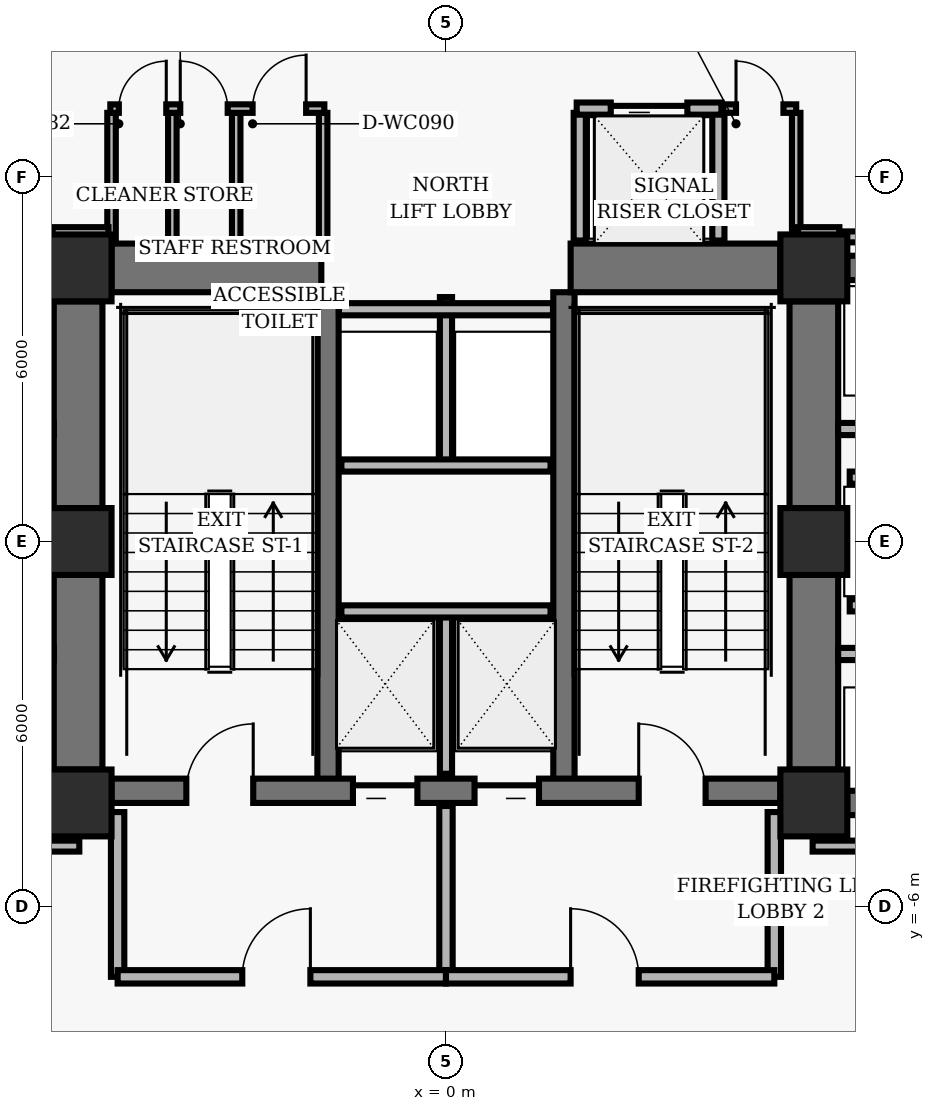
"""IFC4 building model, lengths in metres.
Left out: names, types, materials, properties, quantities, classifications, styles, units other than length and angle.
Written with IfcOpenShell. Run it as: python <this file> out.ifc"""

import sys

from ifc_helpers import new_model, si_unit, direction, frame, frame_2d, origin, origin_2d, place, context, subcontext, project, spatial, rectangle, hollow_rectangle, extrude, element, fill, save


model = new_model("IFC4")
c1 = context("Model", 3, precision=1e-05, world=origin(), true_north=direction((0.0, 1.0)))
c2 = subcontext(c1, "Body", "Model", "MODEL_VIEW")
j1 = project(units=[si_unit("LENGTHUNIT", "METRE"), si_unit("PLANEANGLEUNIT", "RADIAN")], contexts=[c1])
p1 = place(None, origin())
s1 = spatial("IfcSite", under=j1, at=p1, CompositionType="ELEMENT")
p2 = place(p1, origin())
s2 = spatial("IfcBuilding", under=s1, at=p2, CompositionType="ELEMENT")
p3 = place(p2, frame((0.0, 0.0, 8.32)))
s3 = spatial("IfcBuildingStorey", under=s2, at=p3, CompositionType="ELEMENT", Elevation=8.32)
for number, where, z_axis, x_axis in (
    (1, (-6.05, 4.5, 0.0), (0.0, 0.0, 1.0), (1.0, 0.0, 0.0)),
    (2, (6.05, 4.5, 0.0), (0.0, 0.0, 1.0), (1.0, 0.0, 0.0)),
    (3, (-6.05, 0.0, 0.0), (0.0, 0.0, 1.0), (1.0, 0.0, 0.0)),
    (4, (6.05, 0.0, 0.0), (0.0, 0.0, 1.0), (1.0, 0.0, 0.0)),
    (5, (-6.05, -4.3, 0.0), (0.0, 0.0, 1.0), (1.0, 0.0, 0.0)),
    (6, (6.05, -4.3, 0.0), (0.0, 0.0, 1.0), (1.0, 0.0, 0.0)),
):
    element("IfcColumn", number, at=place(p3, frame(where, z_axis=z_axis, x_axis=x_axis)), inside=s3, PredefinedType="COLUMN", context=c2, shape_type="SweptSolid", body=[
        extrude(hollow_rectangle(XDim=1.1, YDim=1.1, WallThickness=0.07, InnerFilletRadius=0.02, OuterFilletRadius=0.04, at=origin_2d()), origin(), (0.0, 0.0, 1.0), 3.52),
    ])
p4 = place(p3, frame((-6.05, 0.55, 0.0), z_axis=(0.0, 0.0, 1.0), x_axis=(0.0, 1.0, 0.0)))
e7 = element("IfcWall", 7, at=p4, inside=s3, PredefinedType="SHEAR", context=c2, shape_type="SweptSolid", body=[
    extrude(rectangle(XDim=3.4, YDim=0.8, at=frame_2d((1.7, 0.0))), origin(), (0.0, 0.0, 1.0), 3.218),
])
p5 = place(p3, frame((-6.05, -3.75, 0.0), z_axis=(0.0, 0.0, 1.0), x_axis=(0.0, 1.0, 0.0)))
e8 = element("IfcWall", 8, at=p5, inside=s3, PredefinedType="SHEAR", context=c2, shape_type="SweptSolid", body=[
    extrude(rectangle(XDim=3.2, YDim=0.8, at=frame_2d((1.6, 0.0))), origin(), (0.0, 0.0, 1.0), 3.218),
])
p6 = place(p3, frame((6.05, 0.55, 0.0), z_axis=(0.0, 0.0, 1.0), x_axis=(0.0, 1.0, 0.0)))
e9 = element("IfcWall", 9, at=p6, inside=s3, PredefinedType="SHEAR", context=c2, shape_type="SweptSolid", body=[
    extrude(rectangle(XDim=3.4, YDim=0.8, at=frame_2d((1.7, 0.0))), origin(), (0.0, 0.0, 1.0), 3.218),
])
p7 = place(p3, frame((6.05, -3.75, 0.0), z_axis=(0.0, 0.0, 1.0), x_axis=(0.0, 1.0, 0.0)))
e10 = element("IfcWall", 10, at=p7, inside=s3, PredefinedType="SHEAR", context=c2, shape_type="SweptSolid", body=[
    extrude(rectangle(XDim=3.2, YDim=0.8, at=frame_2d((1.6, 0.0))), origin(), (0.0, 0.0, 1.0), 3.218),
])
for number, where, z_axis, x_axis in (
    (11, (-1.94, -4.1, 0.0), (0.0, 0.0, 1.0), (0.0, 1.0, 0.0)),
    (12, (1.94, -4.1, 0.0), (0.0, 0.0, 1.0), (0.0, 1.0, 0.0)),
):
    element("IfcWall", number, at=place(p3, frame(where, z_axis=z_axis, x_axis=x_axis)), inside=s3, PredefinedType="SHEAR", context=c2, shape_type="SweptSolid", body=[
        extrude(rectangle(XDim=8.2, YDim=0.35, at=frame_2d((4.1, 0.0))), origin(), (0.0, 0.0, 1.0), 3.218),
    ])
p8 = place(p3, frame((-5.5, -4.1, 0.0), z_axis=(0.0, 0.0, 1.0), x_axis=(1.0, 0.0, 0.0)))
e13 = element("IfcWall", 13, at=p8, inside=s3, PredefinedType="SHEAR", context=c2, shape_type="SweptSolid", body=[
    extrude(rectangle(XDim=11.0, YDim=0.4, at=frame_2d((5.5, 0.0))), origin(), (0.0, 0.0, 1.0), 3.218),
])
p9 = place(p8, frame((1.23, 0.0, 0.0)))
e14 = element("IfcOpeningElement", 14, at=p9, cuts=e13, PredefinedType="OPENING", context=c2, shape_type="SweptSolid", body=[
    extrude(rectangle(XDim=1.1, YDim=2.04, at=frame_2d((0.55, 1.02))), frame((0.0, 0.21, 0.0), z_axis=(0.0, -1.0, 0.0), x_axis=(1.0, 0.0, 0.0)), (0.0, 0.0, 1.0), 0.42),
])
p10 = place(p8, frame((8.67, 0.0, 0.0)))
e15 = element("IfcOpeningElement", 15, at=p10, cuts=e13, PredefinedType="OPENING", context=c2, shape_type="SweptSolid", body=[
    extrude(rectangle(XDim=1.1, YDim=2.04, at=frame_2d((0.55, 1.02))), frame((0.0, 0.21, 0.0), z_axis=(0.0, -1.0, 0.0), x_axis=(1.0, 0.0, 0.0)), (0.0, 0.0, 1.0), 0.42),
])
p11 = place(p8, frame((3.97, 0.0, 0.0)))
e16 = element("IfcOpeningElement", 16, at=p11, cuts=e13, PredefinedType="OPENING", context=c2, shape_type="SweptSolid", body=[
    extrude(rectangle(XDim=1.06, YDim=2.04, at=frame_2d((0.53, 1.02))), frame((0.0, 0.21, 0.0), z_axis=(0.0, -1.0, 0.0), x_axis=(1.0, 0.0, 0.0)), (0.0, 0.0, 1.0), 0.42),
])
p12 = place(p8, frame((5.97, 0.0, 0.0)))
e17 = element("IfcOpeningElement", 17, at=p12, cuts=e13, PredefinedType="OPENING", context=c2, shape_type="SweptSolid", body=[
    extrude(rectangle(XDim=1.06, YDim=2.04, at=frame_2d((0.53, 1.02))), frame((0.0, 0.21, 0.0), z_axis=(0.0, -1.0, 0.0), x_axis=(1.0, 0.0, 0.0)), (0.0, 0.0, 1.0), 0.42),
])
for number, where, z_axis, x_axis in (
    (18, (-5.5, 4.5, 0.0), (0.0, 0.0, 1.0), (1.0, 0.0, 0.0)),
    (19, (2.05, 4.5, 0.0), (0.0, 0.0, 1.0), (1.0, 0.0, 0.0)),
):
    element("IfcWall", number, at=place(p3, frame(where, z_axis=z_axis, x_axis=x_axis)), inside=s3, PredefinedType="SHEAR", context=c2, shape_type="SweptSolid", body=[
        extrude(rectangle(XDim=3.45, YDim=0.8, at=frame_2d((1.725, 0.0))), origin(), (0.0, 0.0, 1.0), 3.218),
    ])
for number, where, z_axis, x_axis in (
    (20, (6.6, 4.5, 0.0), (0.0, 0.0, 1.0), (1.0, 0.0, 0.0)),
    (21, (6.6, -4.3, 0.0), (0.0, 0.0, 1.0), (1.0, 0.0, 0.0)),
):
    element("IfcWall", number, at=place(p3, frame(where, z_axis=z_axis, x_axis=x_axis)), inside=s3, PredefinedType="SHEAR", context=c2, shape_type="SweptSolid", body=[
        extrude(rectangle(XDim=1.8, YDim=0.4, at=frame_2d((0.9, 0.0))), origin(), (0.0, 0.0, 1.0), 3.218),
    ])
p13 = place(p3, frame((0.0, -3.82, 0.0), z_axis=(0.0, 0.0, 1.0), x_axis=(0.0, 1.0, 0.0)))
e22 = element("IfcWall", 22, at=p13, inside=s3, PredefinedType="PARTITIONING", context=c2, shape_type="SweptSolid", body=[
    extrude(rectangle(XDim=2.67, YDim=0.2, at=frame_2d((1.335, 0.0))), origin(), (0.0, 0.0, 1.0), 3.193),
])
p14 = place(p3, frame((-1.72, -1.15, 0.0), z_axis=(0.0, 0.0, 1.0), x_axis=(1.0, 0.0, 0.0)))
e23 = element("IfcWall", 23, at=p14, inside=s3, PredefinedType="PARTITIONING", context=c2, shape_type="SweptSolid", body=[
    extrude(rectangle(XDim=3.44, YDim=0.2, at=frame_2d((1.72, 0.0))), origin(), (0.0, 0.0, 1.0), 3.193),
])
for number, where, z_axis, x_axis in (
    (24, (-5.4, -7.16, 0.0), (0.0, 0.0, 1.0), (0.0, 1.0, 0.0)),
    (25, (5.4, -7.16, 0.0), (0.0, 0.0, 1.0), (0.0, 1.0, 0.0)),
):
    element("IfcWall", number, at=place(p3, frame(where, z_axis=z_axis, x_axis=x_axis)), inside=s3, PredefinedType="PARTITIONING", context=c2, shape_type="SweptSolid", body=[
        extrude(rectangle(XDim=2.71, YDim=0.22, at=frame_2d((1.355, 0.0))), origin(), (0.0, 0.0, 1.0), 3.193),
    ])
p15 = place(p3, frame((0.0, -7.16, 0.0), z_axis=(0.0, 0.0, 1.0), x_axis=(0.0, 1.0, 0.0)))
e26 = element("IfcWall", 26, at=p15, inside=s3, PredefinedType="PARTITIONING", context=c2, shape_type="SweptSolid", body=[
    extrude(rectangle(XDim=2.81, YDim=0.22, at=frame_2d((1.405, 0.0))), origin(), (0.0, 0.0, 1.0), 3.193),
])
p16 = place(p3, frame((-5.4, -7.16, 0.0), z_axis=(0.0, 0.0, 1.0), x_axis=(1.0, 0.0, 0.0)))
e27 = element("IfcWall", 27, at=p16, inside=s3, PredefinedType="PARTITIONING", context=c2, shape_type="SweptSolid", body=[
    extrude(rectangle(XDim=5.4, YDim=0.22, at=frame_2d((2.7, 0.0))), origin(), (0.0, 0.0, 1.0), 3.193),
])
p17 = place(p16, frame((2.05, 0.0, 0.0)))
e28 = element("IfcOpeningElement", 28, at=p17, cuts=e27, PredefinedType="OPENING", context=c2, shape_type="SweptSolid", body=[
    extrude(rectangle(XDim=1.12, YDim=2.02, at=frame_2d((0.56, 1.01))), frame((0.0, 0.12, 0.0), z_axis=(0.0, -1.0, 0.0), x_axis=(1.0, 0.0, 0.0)), (0.0, 0.0, 1.0), 0.24),
])
p18 = place(p3, frame((0.0, -7.16, 0.0), z_axis=(0.0, 0.0, 1.0), x_axis=(1.0, 0.0, 0.0)))
e29 = element("IfcWall", 29, at=p18, inside=s3, PredefinedType="PARTITIONING", context=c2, shape_type="SweptSolid", body=[
    extrude(rectangle(XDim=5.4, YDim=0.22, at=frame_2d((2.7, 0.0))), origin(), (0.0, 0.0, 1.0), 3.193),
])
p19 = place(p18, frame((2.05, 0.0, 0.0)))
e30 = element("IfcOpeningElement", 30, at=p19, cuts=e29, PredefinedType="OPENING", context=c2, shape_type="SweptSolid", body=[
    extrude(rectangle(XDim=1.12, YDim=2.02, at=frame_2d((0.56, 1.01))), frame((0.0, 0.12, 0.0), z_axis=(0.0, -1.0, 0.0), x_axis=(1.0, 0.0, 0.0)), (0.0, 0.0, 1.0), 0.24),
])
p20 = place(p3, frame((0.0, 1.25, 0.0), z_axis=(0.0, 0.0, 1.0), x_axis=(0.0, 1.0, 0.0)))
e31 = element("IfcWall", 31, at=p20, inside=s3, PredefinedType="PARTITIONING", context=c2, shape_type="SweptSolid", body=[
    extrude(rectangle(XDim=2.77, YDim=0.2, at=frame_2d((1.385, 0.0))), origin(), (0.0, 0.0, 1.0), 3.193),
])
p21 = place(p3, frame((-1.72, 1.25, 0.0), z_axis=(0.0, 0.0, 1.0), x_axis=(1.0, 0.0, 0.0)))
e32 = element("IfcWall", 32, at=p21, inside=s3, PredefinedType="PARTITIONING", context=c2, shape_type="SweptSolid", body=[
    extrude(rectangle(XDim=3.44, YDim=0.2, at=frame_2d((1.72, 0.0))), origin(), (0.0, 0.0, 1.0), 3.193),
])
p22 = place(p3, frame((-1.76, 3.82, 0.0), z_axis=(0.0, 0.0, 1.0), x_axis=(1.0, 0.0, 0.0)))
e33 = element("IfcWall", 33, at=p22, inside=s3, PredefinedType="PARTITIONING", context=c2, shape_type="SweptSolid", body=[
    extrude(rectangle(XDim=3.52, YDim=0.2, at=frame_2d((1.76, 0.0))), origin(), (0.0, 0.0, 1.0), 3.193),
])
for number, where, z_axis, x_axis in (
    (34, (2.2, 4.95, 0.0), (0.0, 0.0, 1.0), (0.0, 1.0, 0.0)),
    (35, (4.48, 4.95, 0.0), (0.0, 0.0, 1.0), (0.0, 1.0, 0.0)),
):
    element("IfcWall", number, at=place(p3, frame(where, z_axis=z_axis, x_axis=x_axis)), inside=s3, PredefinedType="PARTITIONING", context=c2, shape_type="SweptSolid", body=[
        extrude(rectangle(XDim=2.1, YDim=0.2, at=frame_2d((1.05, 0.0))), origin(), (0.0, 0.0, 1.0), 3.193),
    ])
p23 = place(p3, frame((2.15, 7.12, 0.0), z_axis=(0.0, 0.0, 1.0), x_axis=(1.0, 0.0, 0.0)))
e36 = element("IfcWall", 36, at=p23, inside=s3, PredefinedType="PARTITIONING", context=c2, shape_type="SweptSolid", body=[
    extrude(rectangle(XDim=2.38, YDim=0.2, at=frame_2d((1.19, 0.0))), origin(), (0.0, 0.0, 1.0), 3.193),
])
p24 = place(p23, frame((0.56, 0.0, 0.0)))
e37 = element("IfcOpeningElement", 37, at=p24, cuts=e36, PredefinedType="OPENING", context=c2, shape_type="SweptSolid", body=[
    extrude(rectangle(XDim=1.26, YDim=2.06, at=frame_2d((0.63, 1.03))), frame((0.0, 0.11, 0.0), z_axis=(0.0, -1.0, 0.0), x_axis=(1.0, 0.0, 0.0)), (0.0, 0.0, 1.0), 0.22),
])
for number, where, z_axis, x_axis in (
    (38, (-5.5, 4.95, 0.0), (0.0, 0.0, 1.0), (0.0, 1.0, 0.0)),
    (39, (-4.5, 4.95, 0.0), (0.0, 0.0, 1.0), (0.0, 1.0, 0.0)),
    (40, (-3.45, 4.95, 0.0), (0.0, 0.0, 1.0), (0.0, 1.0, 0.0)),
    (41, (-2.02, 4.95, 0.0), (0.0, 0.0, 1.0), (0.0, 1.0, 0.0)),
):
    element("IfcWall", number, at=place(p3, frame(where, z_axis=z_axis, x_axis=x_axis)), inside=s3, PredefinedType="PARTITIONING", context=c2, shape_type="SweptSolid", body=[
        extrude(rectangle(XDim=2.1, YDim=0.14, at=frame_2d((1.05, 0.0))), origin(), (0.0, 0.0, 1.0), 3.193),
    ])
p25 = place(p3, frame((-5.52, 7.12, 0.0), z_axis=(0.0, 0.0, 1.0), x_axis=(1.0, 0.0, 0.0)))
e42 = element("IfcWall", 42, at=p25, inside=s3, PredefinedType="PARTITIONING", context=c2, shape_type="SweptSolid", body=[
    extrude(rectangle(XDim=3.52, YDim=0.14, at=frame_2d((1.76, 0.0))), origin(), (0.0, 0.0, 1.0), 3.193),
])
p26 = place(p25, frame((0.14, 0.0, 0.0)))
e43 = element("IfcOpeningElement", 43, at=p26, cuts=e42, PredefinedType="OPENING", context=c2, shape_type="SweptSolid", body=[
    extrude(rectangle(XDim=0.78, YDim=2.01, at=frame_2d((0.39, 1.005))), frame((0.0, 0.08, 0.0), z_axis=(0.0, -1.0, 0.0), x_axis=(1.0, 0.0, 0.0)), (0.0, 0.0, 1.0), 0.16),
])
p27 = place(p25, frame((1.15, 0.0, 0.0)))
e44 = element("IfcOpeningElement", 44, at=p27, cuts=e42, PredefinedType="OPENING", context=c2, shape_type="SweptSolid", body=[
    extrude(rectangle(XDim=0.78, YDim=2.01, at=frame_2d((0.39, 1.005))), frame((0.0, 0.08, 0.0), z_axis=(0.0, -1.0, 0.0), x_axis=(1.0, 0.0, 0.0)), (0.0, 0.0, 1.0), 0.16),
])
p28 = place(p25, frame((2.34, 0.0, 0.0)))
e45 = element("IfcOpeningElement", 45, at=p28, cuts=e42, PredefinedType="OPENING", context=c2, shape_type="SweptSolid", body=[
    extrude(rectangle(XDim=0.88, YDim=2.02, at=frame_2d((0.44, 1.01))), frame((0.0, 0.08, 0.0), z_axis=(0.0, -1.0, 0.0), x_axis=(1.0, 0.0, 0.0)), (0.0, 0.0, 1.0), 0.16),
])
p29 = place(p3, frame((5.76, 4.95, 0.0), z_axis=(0.0, 0.0, 1.0), x_axis=(0.0, 1.0, 0.0)))
e46 = element("IfcWall", 46, at=p29, inside=s3, PredefinedType="PARTITIONING", context=c2, shape_type="SweptSolid", body=[
    extrude(rectangle(XDim=2.1, YDim=0.14, at=frame_2d((1.05, 0.0))), origin(), (0.0, 0.0, 1.0), 2.246),
])
p30 = place(p3, frame((4.56, 7.12, 0.0), z_axis=(0.0, 0.0, 1.0), x_axis=(1.0, 0.0, 0.0)))
e47 = element("IfcWall", 47, at=p30, inside=s3, PredefinedType="PARTITIONING", context=c2, shape_type="SweptSolid", body=[
    extrude(rectangle(XDim=1.2, YDim=0.14, at=frame_2d((0.6, 0.0))), origin(), (0.0, 0.0, 1.0), 3.193),
])
p31 = place(p30, frame((0.21, 0.0, 0.0)))
e48 = element("IfcOpeningElement", 48, at=p31, cuts=e47, PredefinedType="OPENING", context=c2, shape_type="SweptSolid", body=[
    extrude(rectangle(XDim=0.78, YDim=2.01, at=frame_2d((0.39, 1.005))), frame((0.0, 0.08, 0.0), z_axis=(0.0, -1.0, 0.0), x_axis=(1.0, 0.0, 0.0)), (0.0, 0.0, 1.0), 0.16),
])
for number, where, z_axis, x_axis in (
    (49, (-8.55, -1.85, 0.0), (0.0, 0.0, 1.0), (1.0, 0.0, 0.0)),
    (50, (-8.55, 1.85, 0.0), (0.0, 0.0, 1.0), (1.0, 0.0, 0.0)),
    (51, (6.45, -1.85, 0.0), (0.0, 0.0, 1.0), (1.0, 0.0, 0.0)),
    (52, (6.45, 1.85, 0.0), (0.0, 0.0, 1.0), (1.0, 0.0, 0.0)),
):
    element("IfcWall", number, at=place(p3, frame(where, z_axis=z_axis, x_axis=x_axis)), inside=s3, PredefinedType="PARTITIONING", context=c2, shape_type="SweptSolid", body=[
        extrude(rectangle(XDim=2.1, YDim=0.2, at=frame_2d((1.05, 0.0))), origin(), (0.0, 0.0, 1.0), 3.193),
    ])
for number, where, z_axis, x_axis in (
    (53, (6.64, -1.05, 0.0), (0.0, 0.0, 1.0), (1.0, 0.0, 0.0)),
    (54, (6.64, 1.05, 0.0), (0.0, 0.0, 1.0), (1.0, 0.0, 0.0)),
):
    element("IfcWall", number, at=place(p3, frame(where, z_axis=z_axis, x_axis=x_axis)), inside=s3, PredefinedType="PARTITIONING", context=c2, shape_type="SweptSolid", body=[
        extrude(rectangle(XDim=1.91, YDim=0.2, at=frame_2d((0.955, 0.0))), origin(), (0.0, 0.0, 1.0), 3.193),
    ])
for number, where, z_axis, x_axis in (
    (55, (-9.37, -5.01, 0.0), (0.0, 0.0, 1.0), (1.0, 0.0, 0.0)),
    (56, (6.03, -5.01, 0.0), (0.0, 0.0, 1.0), (1.0, 0.0, 0.0)),
):
    element("IfcWall", number, at=place(p3, frame(where, z_axis=z_axis, x_axis=x_axis)), inside=s3, PredefinedType="PARTITIONING", context=c2, shape_type="SweptSolid", body=[
        extrude(rectangle(XDim=3.34, YDim=0.18, at=frame_2d((1.67, 0.0))), origin(), (0.0, 0.0, 1.0), 3.193),
    ])
p32 = place(p3, frame((9.37, 5.01, 0.0), z_axis=(0.0, 0.0, 1.0), x_axis=(-1.0, 0.0, 0.0)))
e57 = element("IfcWall", 57, at=p32, inside=s3, PredefinedType="PARTITIONING", context=c2, shape_type="SweptSolid", body=[
    extrude(rectangle(XDim=2.808, YDim=0.18, at=frame_2d((1.404, 0.0))), origin(), (0.0, 0.0, 1.0), 3.193),
])
p33 = place(p3, frame((6.47, 5.08, 0.0), z_axis=(0.0, 0.0, 1.0), x_axis=(-1.0, 0.0, 0.0)))
e58 = element("IfcWall", 58, at=p33, inside=s3, PredefinedType="PARTITIONING", context=c2, shape_type="SweptSolid", body=[
    extrude(rectangle(XDim=0.68, YDim=0.18, at=frame_2d((0.34, 0.0))), origin(), (0.0, 0.0, 1.0), 3.193),
])
p34 = place(p3, frame((-5.55, 5.08, 0.0), z_axis=(0.0, 0.0, 1.0), x_axis=(-1.0, 0.0, 0.0)))
e59 = element("IfcWall", 59, at=p34, inside=s3, PredefinedType="PARTITIONING", context=c2, shape_type="SweptSolid", body=[
    extrude(rectangle(XDim=0.92, YDim=0.18, at=frame_2d((0.46, 0.0))), origin(), (0.0, 0.0, 1.0), 3.193),
])
p35 = place(p9, origin())
e60 = element("IfcDoor", 60, at=p35, inside=s3, OperationType="SINGLE_SWING_RIGHT", PredefinedType="DOOR", context=c2, shape_type="SweptSolid", body=[
    extrude(rectangle(XDim=1.1, YDim=2.04, at=frame_2d((0.55, 1.02))), frame((0.0, 0.025, 0.0), z_axis=(0.0, -1.0, 0.0), x_axis=(1.0, 0.0, 0.0)), (0.0, 0.0, 1.0), 0.05),
])
fill(e14, e60)
p36 = place(p10, origin())
e61 = element("IfcDoor", 61, at=p36, inside=s3, OperationType="SINGLE_SWING_LEFT", PredefinedType="DOOR", context=c2, shape_type="SweptSolid", body=[
    extrude(rectangle(XDim=1.1, YDim=2.04, at=frame_2d((0.55, 1.02))), frame((0.0, 0.025, 0.0), z_axis=(0.0, -1.0, 0.0), x_axis=(1.0, 0.0, 0.0)), (0.0, 0.0, 1.0), 0.05),
])
fill(e15, e61)
p37 = place(p11, origin())
e62 = element("IfcDoor", 62, at=p37, inside=s3, OperationType="SLIDING_TO_LEFT", PredefinedType="DOOR", context=c2, shape_type="SweptSolid", body=[
    extrude(rectangle(XDim=1.06, YDim=2.04, at=frame_2d((0.53, 1.02))), frame((0.0, 0.025, 0.0), z_axis=(0.0, -1.0, 0.0), x_axis=(1.0, 0.0, 0.0)), (0.0, 0.0, 1.0), 0.05),
])
fill(e16, e62)
p38 = place(p12, origin())
e63 = element("IfcDoor", 63, at=p38, inside=s3, OperationType="SLIDING_TO_RIGHT", PredefinedType="DOOR", context=c2, shape_type="SweptSolid", body=[
    extrude(rectangle(XDim=1.06, YDim=2.04, at=frame_2d((0.53, 1.02))), frame((0.0, 0.025, 0.0), z_axis=(0.0, -1.0, 0.0), x_axis=(1.0, 0.0, 0.0)), (0.0, 0.0, 1.0), 0.05),
])
fill(e17, e63)
p39 = place(p17, origin())
e64 = element("IfcDoor", 64, at=p39, inside=s3, OperationType="SINGLE_SWING_RIGHT", PredefinedType="DOOR", context=c2, shape_type="SweptSolid", body=[
    extrude(rectangle(XDim=1.12, YDim=2.02, at=frame_2d((0.56, 1.01))), frame((0.0, 0.025, 0.0), z_axis=(0.0, -1.0, 0.0), x_axis=(1.0, 0.0, 0.0)), (0.0, 0.0, 1.0), 0.05),
])
fill(e28, e64)
p40 = place(p19, origin())
e65 = element("IfcDoor", 65, at=p40, inside=s3, OperationType="SINGLE_SWING_LEFT", PredefinedType="DOOR", context=c2, shape_type="SweptSolid", body=[
    extrude(rectangle(XDim=1.12, YDim=2.02, at=frame_2d((0.56, 1.01))), frame((0.0, 0.025, 0.0), z_axis=(0.0, -1.0, 0.0), x_axis=(1.0, 0.0, 0.0)), (0.0, 0.0, 1.0), 0.05),
])
fill(e30, e65)
p41 = place(p24, origin())
e66 = element("IfcDoor", 66, at=p41, inside=s3, OperationType="SLIDING_TO_LEFT", PredefinedType="DOOR", context=c2, shape_type="SweptSolid", body=[
    extrude(rectangle(XDim=1.26, YDim=2.06, at=frame_2d((0.63, 1.03))), frame((0.0, 0.025, 0.0), z_axis=(0.0, -1.0, 0.0), x_axis=(1.0, 0.0, 0.0)), (0.0, 0.0, 1.0), 0.05),
])
fill(e37, e66)
p42 = place(p26, origin())
e67 = element("IfcDoor", 67, at=p42, inside=s3, OperationType="SINGLE_SWING_RIGHT", PredefinedType="DOOR", context=c2, shape_type="SweptSolid", body=[
    extrude(rectangle(XDim=0.78, YDim=2.01, at=frame_2d((0.39, 1.005))), frame((0.0, 0.025, 0.0), z_axis=(0.0, -1.0, 0.0), x_axis=(1.0, 0.0, 0.0)), (0.0, 0.0, 1.0), 0.05),
])
fill(e43, e67)
p43 = place(p27, origin())
e68 = element("IfcDoor", 68, at=p43, inside=s3, OperationType="SINGLE_SWING_LEFT", PredefinedType="DOOR", context=c2, shape_type="SweptSolid", body=[
    extrude(rectangle(XDim=0.78, YDim=2.01, at=frame_2d((0.39, 1.005))), frame((0.0, 0.025, 0.0), z_axis=(0.0, -1.0, 0.0), x_axis=(1.0, 0.0, 0.0)), (0.0, 0.0, 1.0), 0.05),
])
fill(e44, e68)
p44 = place(p28, origin())
e69 = element("IfcDoor", 69, at=p44, inside=s3, OperationType="SINGLE_SWING_RIGHT", PredefinedType="DOOR", context=c2, shape_type="SweptSolid", body=[
    extrude(rectangle(XDim=0.88, YDim=2.02, at=frame_2d((0.44, 1.01))), frame((0.0, 0.025, 0.0), z_axis=(0.0, -1.0, 0.0), x_axis=(1.0, 0.0, 0.0)), (0.0, 0.0, 1.0), 0.05),
])
fill(e45, e69)
p45 = place(p31, origin())
e70 = element("IfcDoor", 70, at=p45, inside=s3, OperationType="SINGLE_SWING_LEFT", PredefinedType="DOOR", context=c2, shape_type="SweptSolid", body=[
    extrude(rectangle(XDim=0.78, YDim=2.01, at=frame_2d((0.39, 1.005))), frame((0.0, 0.025, 0.0), z_axis=(0.0, -1.0, 0.0), x_axis=(1.0, 0.0, 0.0)), (0.0, 0.0, 1.0), 0.05),
])
fill(e48, e70)
save(model, sys.argv[1])
